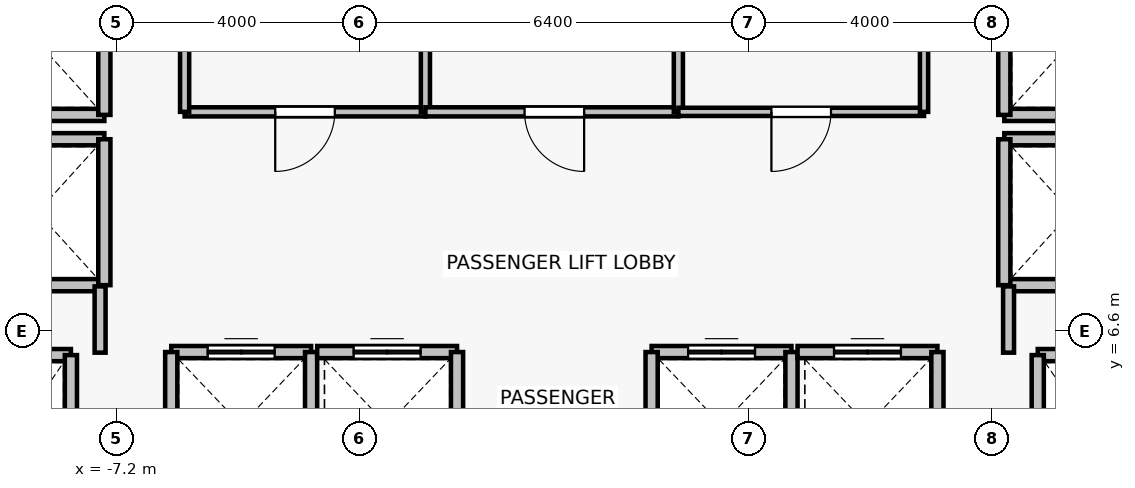
"""IFC4 building model, lengths in metres.
Left out: names, types, materials, properties, quantities, classifications, styles, units other than length and angle.
Written with IfcOpenShell. Run it as: python <this file> out.ifc"""

import sys

from ifc_helpers import new_model, si_unit, direction, frame, frame_2d, origin, place, context, subcontext, project, spatial, rectangle, extrude, source, transform, mapped, element, fill, save


model = new_model("IFC4")
c1 = context("Model", 3, precision=1e-05, world=origin(), true_north=direction((0.0, 1.0)))
c2 = subcontext(c1, "Body", "Model", "MODEL_VIEW")
j1 = project(units=[si_unit("LENGTHUNIT", "METRE"), si_unit("PLANEANGLEUNIT", "RADIAN")], contexts=[c1])
p1 = place(None, origin())
s1 = spatial("IfcSite", under=j1, at=p1, CompositionType="ELEMENT")
p2 = place(p1, origin())
s2 = spatial("IfcBuilding", under=s1, at=p2, CompositionType="ELEMENT")
p3 = place(p2, frame((0.0, 0.0, 195.7)))
s3 = spatial("IfcBuildingStorey", under=s2, at=p3, CompositionType="ELEMENT", Elevation=195.7)
p4 = place(p3, frame((-9.95, 6.2, 0.0), z_axis=(0.0, 0.0, 1.0), x_axis=(1.0, 0.0, 0.0)))
e1 = element("IfcWall", 1, at=p4, inside=s3, PredefinedType="SOLIDWALL", context=c2, shape_type="SweptSolid", body=[
    extrude(rectangle(XDim=2.0, YDim=0.2, at=frame_2d((1.0, 0.0))), origin(), (0.0, 0.0, 1.0), 3.05),
])
p5 = place(p3, frame((-7.95, 6.2, 0.0), z_axis=(0.0, 0.0, 1.0), x_axis=(0.0, -1.0, 0.0)))
e2 = element("IfcWall", 2, at=p5, inside=s3, PredefinedType="SOLIDWALL", context=c2, shape_type="SweptSolid", body=[
    extrude(rectangle(XDim=2.8, YDim=0.2, at=frame_2d((1.4, 0.0))), origin(), (0.0, 0.0, 1.0), 3.05),
])
p6 = place(p3, frame((7.95, 6.2, 0.0), z_axis=(0.0, 0.0, 1.0), x_axis=(1.0, 0.0, 0.0)))
e3 = element("IfcWall", 3, at=p6, inside=s3, PredefinedType="SOLIDWALL", context=c2, shape_type="SweptSolid", body=[
    extrude(rectangle(XDim=2.0, YDim=0.2, at=frame_2d((1.0, 0.0))), origin(), (0.0, 0.0, 1.0), 3.05),
])
p7 = place(p3, frame((7.95, 3.4, 0.0), z_axis=(0.0, 0.0, 1.0), x_axis=(0.0, 1.0, 0.0)))
e4 = element("IfcWall", 4, at=p7, inside=s3, PredefinedType="SOLIDWALL", context=c2, shape_type="SweptSolid", body=[
    extrude(rectangle(XDim=2.8, YDim=0.2, at=frame_2d((1.4, 0.0))), origin(), (0.0, 0.0, 1.0), 3.05),
])
p8 = place(p3, frame((-6.3, 6.25, 0.0), z_axis=(0.0, 0.0, 1.0), x_axis=(1.0, 0.0, 0.0)))
e5 = element("IfcWall", 5, at=p8, inside=s3, PredefinedType="SOLIDWALL", context=c2, shape_type="SweptSolid", body=[
    extrude(rectangle(XDim=2.3, YDim=0.2, at=frame_2d((1.15, 0.0))), origin(), (0.0, 0.0, 1.0), 3.05),
])
p9 = place(p8, frame((0.6, 0.0, 0.0)))
e6 = element("IfcOpeningElement", 6, at=p9, cuts=e5, PredefinedType="OPENING", context=c2, shape_type="SweptSolid", body=[
    extrude(rectangle(XDim=1.1, YDim=2.2, at=frame_2d((0.55, 1.1))), frame((0.0, 0.11, 0.0), z_axis=(0.0, -1.0, 0.0), x_axis=(1.0, 0.0, 0.0)), (0.0, 0.0, 1.0), 0.22),
])
for number, where, z_axis, x_axis in (
    (7, (-6.3, 3.85, 0.0), (0.0, 0.0, 1.0), (0.0, 1.0, 0.0)),
    (8, (-4.0, 6.25, 0.0), (0.0, 0.0, 1.0), (0.0, -1.0, 0.0)),
):
    element("IfcWall", number, at=place(p3, frame(where, z_axis=z_axis, x_axis=x_axis)), inside=s3, PredefinedType="SOLIDWALL", context=c2, shape_type="SweptSolid", body=[
        extrude(rectangle(XDim=2.4, YDim=0.2, at=frame_2d((1.2, 0.0))), origin(), (0.0, 0.0, 1.0), 3.05),
    ])
p10 = place(p3, frame((-3.9, 6.25, 0.0), z_axis=(0.0, 0.0, 1.0), x_axis=(1.0, 0.0, 0.0)))
e9 = element("IfcWall", 9, at=p10, inside=s3, PredefinedType="SOLIDWALL", context=c2, shape_type="SweptSolid", body=[
    extrude(rectangle(XDim=2.3, YDim=0.2, at=frame_2d((1.15, 0.0))), origin(), (0.0, 0.0, 1.0), 3.05),
])
p11 = place(p10, frame((0.6, 0.0, 0.0)))
e10 = element("IfcOpeningElement", 10, at=p11, cuts=e9, PredefinedType="OPENING", context=c2, shape_type="SweptSolid", body=[
    extrude(rectangle(XDim=1.1, YDim=2.2, at=frame_2d((0.55, 1.1))), frame((0.0, 0.11, 0.0), z_axis=(0.0, -1.0, 0.0), x_axis=(1.0, 0.0, 0.0)), (0.0, 0.0, 1.0), 0.22),
])
p12 = place(p3, frame((-1.6, 6.25, 0.0), z_axis=(0.0, 0.0, 1.0), x_axis=(0.0, -1.0, 0.0)))
e11 = element("IfcWall", 11, at=p12, inside=s3, PredefinedType="SOLIDWALL", context=c2, shape_type="SweptSolid", body=[
    extrude(rectangle(XDim=2.4, YDim=0.2, at=frame_2d((1.2, 0.0))), origin(), (0.0, 0.0, 1.0), 3.05),
])
p13 = place(p3, frame((1.6, 6.25, 0.0), z_axis=(0.0, 0.0, 1.0), x_axis=(1.0, 0.0, 0.0)))
e12 = element("IfcWall", 12, at=p13, inside=s3, PredefinedType="SOLIDWALL", context=c2, shape_type="SweptSolid", body=[
    extrude(rectangle(XDim=2.3, YDim=0.2, at=frame_2d((1.15, 0.0))), origin(), (0.0, 0.0, 1.0), 3.05),
])
p14 = place(p13, frame((0.6, 0.0, 0.0)))
e13 = element("IfcOpeningElement", 13, at=p14, cuts=e12, PredefinedType="OPENING", context=c2, shape_type="SweptSolid", body=[
    extrude(rectangle(XDim=1.1, YDim=2.2, at=frame_2d((0.55, 1.1))), frame((0.0, 0.11, 0.0), z_axis=(0.0, -1.0, 0.0), x_axis=(1.0, 0.0, 0.0)), (0.0, 0.0, 1.0), 0.22),
])
for number, where, z_axis, x_axis in (
    (14, (1.6, 3.85, 0.0), (0.0, 0.0, 1.0), (0.0, 1.0, 0.0)),
    (15, (3.9, 6.25, 0.0), (0.0, 0.0, 1.0), (0.0, -1.0, 0.0)),
):
    element("IfcWall", number, at=place(p3, frame(where, z_axis=z_axis, x_axis=x_axis)), inside=s3, PredefinedType="SOLIDWALL", context=c2, shape_type="SweptSolid", body=[
        extrude(rectangle(XDim=2.4, YDim=0.2, at=frame_2d((1.2, 0.0))), origin(), (0.0, 0.0, 1.0), 3.05),
    ])
p15 = place(p3, frame((4.0, 6.25, 0.0), z_axis=(0.0, 0.0, 1.0), x_axis=(1.0, 0.0, 0.0)))
e16 = element("IfcWall", 16, at=p15, inside=s3, PredefinedType="SOLIDWALL", context=c2, shape_type="SweptSolid", body=[
    extrude(rectangle(XDim=2.3, YDim=0.2, at=frame_2d((1.15, 0.0))), origin(), (0.0, 0.0, 1.0), 3.05),
])
p16 = place(p15, frame((0.6, 0.0, 0.0)))
e17 = element("IfcOpeningElement", 17, at=p16, cuts=e16, PredefinedType="OPENING", context=c2, shape_type="SweptSolid", body=[
    extrude(rectangle(XDim=1.1, YDim=2.2, at=frame_2d((0.55, 1.1))), frame((0.0, 0.11, 0.0), z_axis=(0.0, -1.0, 0.0), x_axis=(1.0, 0.0, 0.0)), (0.0, 0.0, 1.0), 0.22),
])
p17 = place(p3, frame((6.3, 6.25, 0.0), z_axis=(0.0, 0.0, 1.0), x_axis=(0.0, -1.0, 0.0)))
e18 = element("IfcWall", 18, at=p17, inside=s3, PredefinedType="SOLIDWALL", context=c2, shape_type="SweptSolid", body=[
    extrude(rectangle(XDim=2.4, YDim=0.2, at=frame_2d((1.2, 0.0))), origin(), (0.0, 0.0, 1.0), 3.05),
])
for number, where, z_axis, x_axis in (
    (19, (-7.4, 7.35, 0.0), (0.0, 0.0, 1.0), (-1.0, 0.0, 0.0)),
    (20, (-9.6, 9.75, 0.0), (0.0, 0.0, 1.0), (1.0, 0.0, 0.0)),
):
    element("IfcWall", number, at=place(p3, frame(where, z_axis=z_axis, x_axis=x_axis)), inside=s3, PredefinedType="SOLIDWALL", context=c2, shape_type="SweptSolid", body=[
        extrude(rectangle(XDim=2.2, YDim=0.2, at=frame_2d((1.1, 0.0))), origin(), (0.0, 0.0, 1.0), 2.54),
    ])
p18 = place(p3, frame((-7.4, 9.75, 0.0), z_axis=(0.0, 0.0, 1.0), x_axis=(0.0, -1.0, 0.0)))
e21 = element("IfcWall", 21, at=p18, inside=s3, PredefinedType="SOLIDWALL", context=c2, shape_type="SweptSolid", body=[
    extrude(rectangle(XDim=2.4, YDim=0.2, at=frame_2d((1.2, 0.0))), origin(), (0.0, 0.0, 1.0), 2.54),
])
p19 = place(p3, frame((-7.4, 10.15, 0.0), z_axis=(0.0, 0.0, 1.0), x_axis=(-1.0, 0.0, 0.0)))
e22 = element("IfcWall", 22, at=p19, inside=s3, PredefinedType="SOLIDWALL", context=c2, shape_type="SweptSolid", body=[
    extrude(rectangle(XDim=2.2, YDim=0.2, at=frame_2d((1.1, 0.0))), origin(), (0.0, 0.0, 1.0), 2.54),
])
p20 = place(p3, frame((-7.4, 12.55, 0.0), z_axis=(0.0, 0.0, 1.0), x_axis=(0.0, -1.0, 0.0)))
e23 = element("IfcWall", 23, at=p20, inside=s3, PredefinedType="SOLIDWALL", context=c2, shape_type="SweptSolid", body=[
    extrude(rectangle(XDim=2.4, YDim=0.2, at=frame_2d((1.2, 0.0))), origin(), (0.0, 0.0, 1.0), 2.54),
])
for number, where, z_axis, x_axis in (
    (24, (9.6, 7.35, 0.0), (0.0, 0.0, 1.0), (-1.0, 0.0, 0.0)),
    (25, (7.4, 9.75, 0.0), (0.0, 0.0, 1.0), (1.0, 0.0, 0.0)),
):
    element("IfcWall", number, at=place(p3, frame(where, z_axis=z_axis, x_axis=x_axis)), inside=s3, PredefinedType="SOLIDWALL", context=c2, shape_type="SweptSolid", body=[
        extrude(rectangle(XDim=2.2, YDim=0.2, at=frame_2d((1.1, 0.0))), origin(), (0.0, 0.0, 1.0), 2.54),
    ])
p21 = place(p3, frame((7.4, 7.35, 0.0), z_axis=(0.0, 0.0, 1.0), x_axis=(0.0, 1.0, 0.0)))
e26 = element("IfcWall", 26, at=p21, inside=s3, PredefinedType="SOLIDWALL", context=c2, shape_type="SweptSolid", body=[
    extrude(rectangle(XDim=2.4, YDim=0.2, at=frame_2d((1.2, 0.0))), origin(), (0.0, 0.0, 1.0), 2.54),
])
p22 = place(p3, frame((9.6, 10.15, 0.0), z_axis=(0.0, 0.0, 1.0), x_axis=(-1.0, 0.0, 0.0)))
e27 = element("IfcWall", 27, at=p22, inside=s3, PredefinedType="SOLIDWALL", context=c2, shape_type="SweptSolid", body=[
    extrude(rectangle(XDim=2.2, YDim=0.2, at=frame_2d((1.1, 0.0))), origin(), (0.0, 0.0, 1.0), 2.54),
])
p23 = place(p3, frame((7.4, 10.15, 0.0), z_axis=(0.0, 0.0, 1.0), x_axis=(0.0, 1.0, 0.0)))
e28 = element("IfcWall", 28, at=p23, inside=s3, PredefinedType="SOLIDWALL", context=c2, shape_type="SweptSolid", body=[
    extrude(rectangle(XDim=2.4, YDim=0.2, at=frame_2d((1.2, 0.0))), origin(), (0.0, 0.0, 1.0), 2.54),
])
for number, where, z_axis, x_axis in (
    (29, (-7.47, 7.33, 0.0), (0.0, 0.0, 1.0), (0.0, -1.0, 0.0)),
    (30, (7.47, 6.24, 0.0), (0.0, 0.0, 1.0), (0.0, 1.0, 0.0)),
):
    element("IfcWall", number, at=place(p3, frame(where, z_axis=z_axis, x_axis=x_axis)), inside=s3, PredefinedType="PARTITIONING", context=c2, shape_type="SweptSolid", body=[
        extrude(rectangle(XDim=1.09, YDim=0.18, at=frame_2d((0.545, 0.0))), origin(), (0.0, 0.0, 1.0), 2.54),
    ])
p24 = place(p3, frame((-2.12, 10.2, 0.0), z_axis=(0.0, 0.0, 1.0), x_axis=(-1.0, 0.0, 0.0)))
e31 = element("IfcWall", 31, at=p24, inside=s3, PredefinedType="PARTITIONING", context=c2, shape_type="SweptSolid", body=[
    extrude(rectangle(XDim=3.96, YDim=0.15, at=frame_2d((1.98, 0.0))), origin(), (0.0, 0.0, 1.0), 3.05),
])
p25 = place(p24, frame((1.49, 0.0, 0.0)))
e32 = element("IfcOpeningElement", 32, at=p25, cuts=e31, PredefinedType="OPENING", context=c2, shape_type="SweptSolid", body=[
    extrude(rectangle(XDim=0.98, YDim=2.15, at=frame_2d((0.49, 1.075))), frame((0.0, 0.085, 0.0), z_axis=(0.0, -1.0, 0.0), x_axis=(1.0, 0.0, 0.0)), (0.0, 0.0, 1.0), 0.17),
])
for number, where, z_axis, x_axis in (
    (33, (-6.08, 10.2, 0.0), (0.0, 0.0, 1.0), (0.0, 1.0, 0.0)),
    (34, (-2.12, 13.0, 0.0), (0.0, 0.0, 1.0), (0.0, -1.0, 0.0)),
):
    element("IfcWall", number, at=place(p3, frame(where, z_axis=z_axis, x_axis=x_axis)), inside=s3, PredefinedType="PARTITIONING", context=c2, shape_type="SweptSolid", body=[
        extrude(rectangle(XDim=2.8, YDim=0.15, at=frame_2d((1.4, 0.0))), origin(), (0.0, 0.0, 1.0), 3.05),
    ])
p26 = place(p3, frame((2.04, 10.2, 0.0), z_axis=(0.0, 0.0, 1.0), x_axis=(-1.0, 0.0, 0.0)))
e35 = element("IfcWall", 35, at=p26, inside=s3, PredefinedType="PARTITIONING", context=c2, shape_type="SweptSolid", body=[
    extrude(rectangle(XDim=4.16, YDim=0.15, at=frame_2d((2.08, 0.0))), origin(), (0.0, 0.0, 1.0), 3.05),
])
p27 = place(p26, frame((1.55, 0.0, 0.0)))
e36 = element("IfcOpeningElement", 36, at=p27, cuts=e35, PredefinedType="OPENING", context=c2, shape_type="SweptSolid", body=[
    extrude(rectangle(XDim=0.98, YDim=2.15, at=frame_2d((0.49, 1.075))), frame((0.0, 0.085, 0.0), z_axis=(0.0, -1.0, 0.0), x_axis=(1.0, 0.0, 0.0)), (0.0, 0.0, 1.0), 0.17),
])
p28 = place(p3, frame((2.04, 13.0, 0.0), z_axis=(0.0, 0.0, 1.0), x_axis=(0.0, -1.0, 0.0)))
e37 = element("IfcWall", 37, at=p28, inside=s3, PredefinedType="PARTITIONING", context=c2, shape_type="SweptSolid", body=[
    extrude(rectangle(XDim=2.8, YDim=0.15, at=frame_2d((1.4, 0.0))), origin(), (0.0, 0.0, 1.0), 3.05),
])
p29 = place(p3, frame((6.08, 10.2, 0.0), z_axis=(0.0, 0.0, 1.0), x_axis=(-1.0, 0.0, 0.0)))
e38 = element("IfcWall", 38, at=p29, inside=s3, PredefinedType="PARTITIONING", context=c2, shape_type="SweptSolid", body=[
    extrude(rectangle(XDim=4.04, YDim=0.135, at=frame_2d((2.02, 0.0))), origin(), (0.0, 0.0, 1.0), 3.05),
])
p30 = place(p29, frame((1.53, 0.0, 0.0)))
e39 = element("IfcOpeningElement", 39, at=p30, cuts=e38, PredefinedType="OPENING", context=c2, shape_type="SweptSolid", body=[
    extrude(rectangle(XDim=0.98, YDim=2.15, at=frame_2d((0.49, 1.075))), frame((0.0, 0.077, 0.0), z_axis=(0.0, -1.0, 0.0), x_axis=(1.0, 0.0, 0.0)), (0.0, 0.0, 1.0), 0.155),
])
p31 = place(p3, frame((6.08, 13.0, 0.0), z_axis=(0.0, 0.0, 1.0), x_axis=(0.0, -1.0, 0.0)))
e40 = element("IfcWall", 40, at=p31, inside=s3, PredefinedType="PARTITIONING", context=c2, shape_type="SweptSolid", body=[
    extrude(rectangle(XDim=2.8, YDim=0.135, at=frame_2d((1.4, 0.0))), origin(), (0.0, 0.0, 1.0), 3.05),
])
m1 = source(origin(), c2, "Body", "SweptSolid", [
    extrude(rectangle(XDim=1.1, YDim=2.2, at=frame_2d((0.55, 1.1))), frame((0.0, 0.025, 0.0), z_axis=(0.0, -1.0, 0.0), x_axis=(1.0, 0.0, 0.0)), (0.0, 0.0, 1.0), 0.05),
])
p32 = place(p9, origin())
e41 = element("IfcDoor", 41, at=p32, inside=s3, OperationType="DOUBLE_DOOR_SLIDING", PredefinedType="DOOR", context=c2, shape_type="MappedRepresentation", body=[
    mapped(m1, transform((0.0, 0.0, 0.0), x_axis=(1.0, 0.0, 0.0), y_axis=(0.0, 1.0, 0.0), z_axis=(0.0, 0.0, 1.0), scale=1.0)),
])
fill(e6, e41)
p33 = place(p11, origin())
e42 = element("IfcDoor", 42, at=p33, inside=s3, OperationType="DOUBLE_DOOR_SLIDING", PredefinedType="DOOR", context=c2, shape_type="MappedRepresentation", body=[
    mapped(m1, transform((0.0, 0.0, 0.0), x_axis=(1.0, 0.0, 0.0), y_axis=(0.0, 1.0, 0.0), z_axis=(0.0, 0.0, 1.0), scale=1.0)),
])
fill(e10, e42)
p34 = place(p14, origin())
e43 = element("IfcDoor", 43, at=p34, inside=s3, OperationType="DOUBLE_DOOR_SLIDING", PredefinedType="DOOR", context=c2, shape_type="MappedRepresentation", body=[
    mapped(m1, transform((0.0, 0.0, 0.0), x_axis=(1.0, 0.0, 0.0), y_axis=(0.0, 1.0, 0.0), z_axis=(0.0, 0.0, 1.0), scale=1.0)),
])
fill(e13, e43)
p35 = place(p16, origin())
e44 = element("IfcDoor", 44, at=p35, inside=s3, OperationType="DOUBLE_DOOR_SLIDING", PredefinedType="DOOR", context=c2, shape_type="MappedRepresentation", body=[
    mapped(m1, transform((0.0, 0.0, 0.0), x_axis=(1.0, 0.0, 0.0), y_axis=(0.0, 1.0, 0.0), z_axis=(0.0, 0.0, 1.0), scale=1.0)),
])
fill(e17, e44)
m2 = source(origin(), c2, "Body", "SweptSolid", [
    extrude(rectangle(XDim=0.98, YDim=2.15, at=frame_2d((0.49, 1.075))), frame((0.0, 0.025, 0.0), z_axis=(0.0, -1.0, 0.0), x_axis=(1.0, 0.0, 0.0)), (0.0, 0.0, 1.0), 0.05),
])
p36 = place(p25, origin())
e45 = element("IfcDoor", 45, at=p36, inside=s3, OperationType="SINGLE_SWING_RIGHT", PredefinedType="DOOR", context=c2, shape_type="MappedRepresentation", body=[
    mapped(m2, transform((0.0, 0.0, 0.0), x_axis=(1.0, 0.0, 0.0), y_axis=(0.0, 1.0, 0.0), z_axis=(0.0, 0.0, 1.0), scale=1.0)),
])
fill(e32, e45)
p37 = place(p27, origin())
e46 = element("IfcDoor", 46, at=p37, inside=s3, OperationType="SINGLE_SWING_LEFT", PredefinedType="DOOR", context=c2, shape_type="MappedRepresentation", body=[
    mapped(m2, transform((0.0, 0.0, 0.0), x_axis=(1.0, 0.0, 0.0), y_axis=(0.0, 1.0, 0.0), z_axis=(0.0, 0.0, 1.0), scale=1.0)),
])
fill(e36, e46)
p38 = place(p30, origin())
e47 = element("IfcDoor", 47, at=p38, inside=s3, OperationType="SINGLE_SWING_RIGHT", PredefinedType="DOOR", context=c2, shape_type="MappedRepresentation", body=[
    mapped(m2, transform((0.0, 0.0, 0.0), x_axis=(1.0, 0.0, 0.0), y_axis=(0.0, 1.0, 0.0), z_axis=(0.0, 0.0, 1.0), scale=1.0)),
])
fill(e39, e47)
save(model, sys.argv[1])
